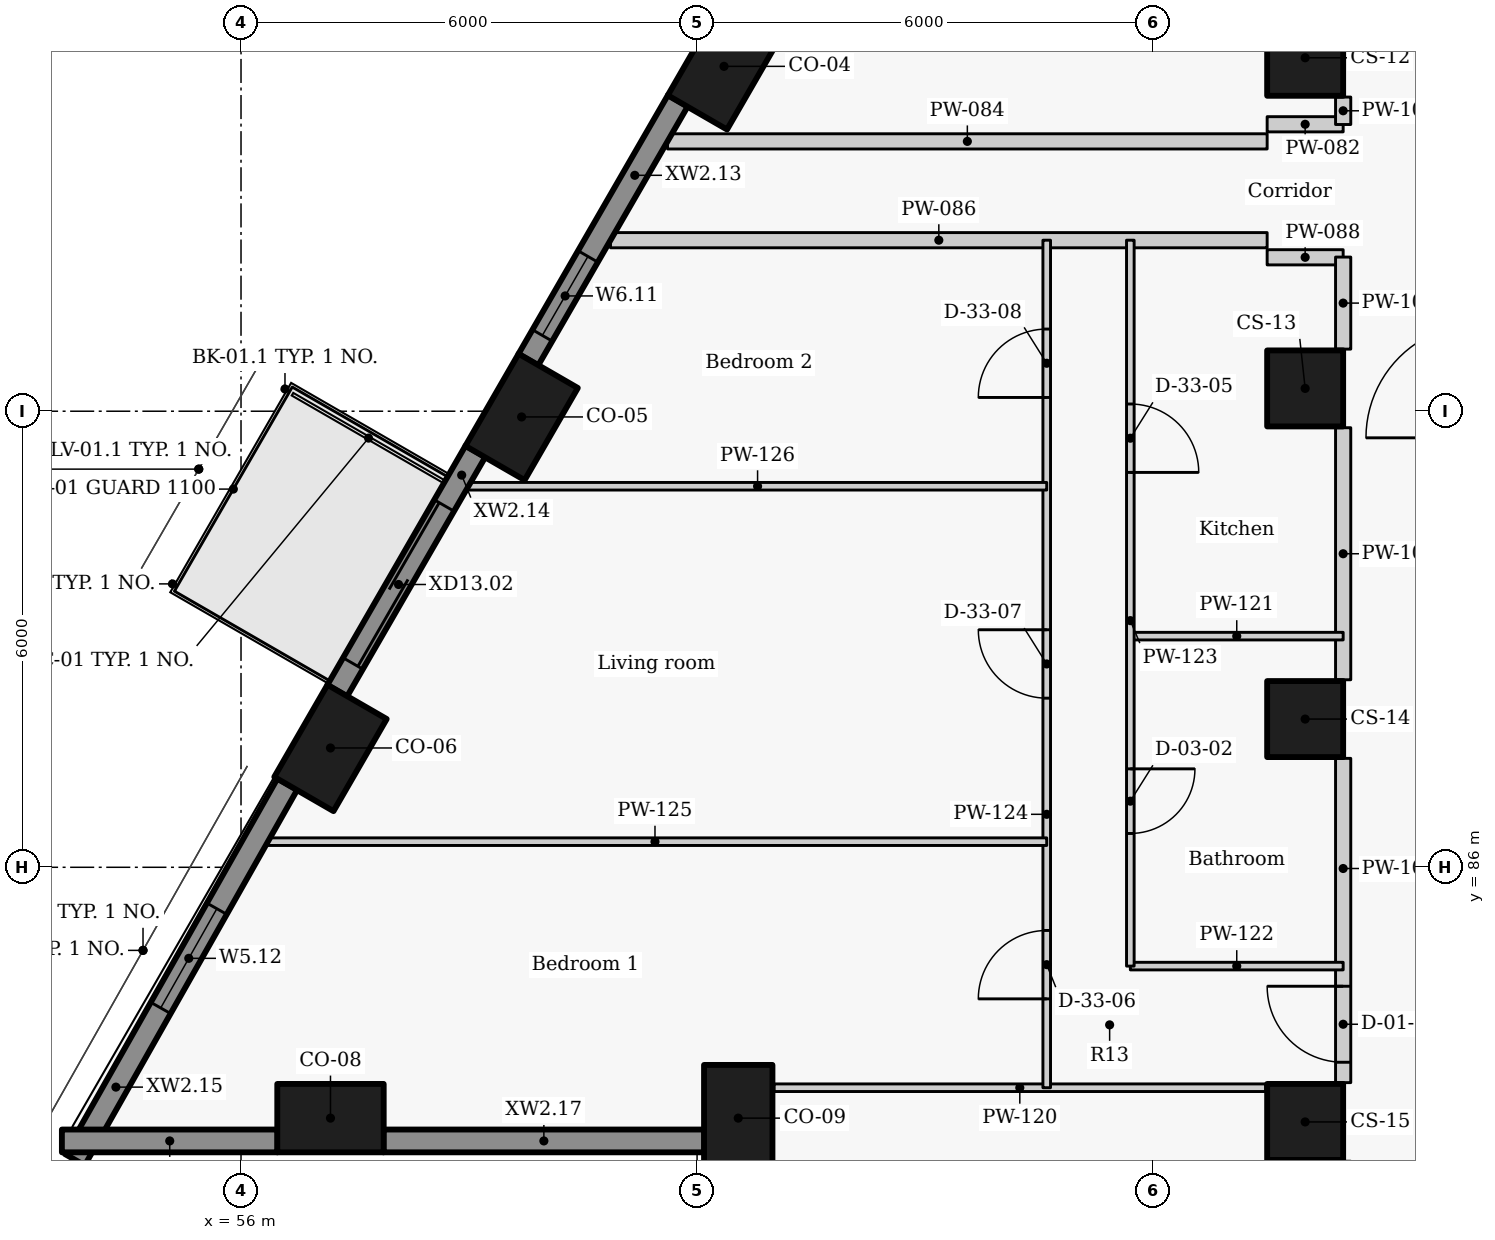
"""IFC4 building model, lengths in metres.
Left out: names, types, materials, properties, quantities, classifications, styles, units other than length and angle.
Written with IfcOpenShell. Run it as: python <this file> out.ifc"""

import sys

from ifc_helpers import new_model, si_unit, direction, frame, frame_2d, origin, origin_2d, place, context, subcontext, project, spatial, rectangle, extrude, element, fill, save


model = new_model("IFC4")
c1 = context("Model", 3, precision=1e-05, world=origin(), true_north=direction((0.0, 1.0)))
c2 = subcontext(c1, "Body", "Model", "MODEL_VIEW")
j1 = project(units=[si_unit("LENGTHUNIT", "METRE"), si_unit("PLANEANGLEUNIT", "RADIAN")], contexts=[c1])
p1 = place(None, origin())
s1 = spatial("IfcSite", under=j1, at=p1, CompositionType="ELEMENT")
p2 = place(p1, origin())
s2 = spatial("IfcBuilding", under=s1, at=p2, CompositionType="ELEMENT")
p3 = place(p2, frame((0.0, 0.0, 114.0)))
s3 = spatial("IfcBuildingStorey", under=s2, at=p3, CompositionType="ELEMENT", Elevation=114.0)
for number, where, z_axis, x_axis in (
    (1, (62.354, 96.537, 0.0), (0.0, 0.0, 1.0), (-0.5, -0.866, 0.0)),
    (2, (59.692, 91.925, 0.0), (0.0, 0.0, 1.0), (-0.5, -0.866, 0.0)),
    (3, (57.177, 87.57, 0.0), (0.0, 0.0, 1.0), (-0.5, -0.866, 0.0)),
    (4, (57.177, 82.7, 0.0), (0.0, 0.0, 1.0), (1.0, 0.0, 0.0)),
    (5, (62.542, 82.7, 0.0), (0.0, 0.0, 1.0), (0.0, -1.0, 0.0)),
):
    element("IfcColumn", number, at=place(p3, frame(where, z_axis=z_axis, x_axis=x_axis)), inside=s3, PredefinedType="COLUMN", context=c2, shape_type="SweptSolid", body=[
        extrude(rectangle(XDim=1.4, YDim=0.9, at=origin_2d()), origin(), (0.0, 0.0, 1.0), 3.3),
    ])
for number, where, z_axis, x_axis in (
    (6, (70.0, 96.65, 0.0), (0.0, 0.0, 1.0), (0.0, -1.0, 0.0)),
    (7, (70.0, 92.3, 0.0), (0.0, 0.0, 1.0), (0.0, -1.0, 0.0)),
    (8, (70.0, 87.95, 0.0), (0.0, 0.0, 1.0), (0.0, -1.0, 0.0)),
    (9, (70.0, 82.65, 0.0), (0.0, 0.0, 1.0), (0.0, -1.0, 0.0)),
):
    element("IfcColumn", number, at=place(p3, frame(where, z_axis=z_axis, x_axis=x_axis)), inside=s3, PredefinedType="COLUMN", context=c2, shape_type="SweptSolid", body=[
        extrude(rectangle(XDim=1.0, YDim=1.0, at=origin_2d()), origin(), (0.0, 0.0, 1.0), 3.3),
    ])
p4 = place(p3, frame((61.747, 96.084, 0.0), z_axis=(0.0, 0.0, 1.0), x_axis=(-0.499957037901, -0.866050206543, 0.0)))
e10 = element("IfcWall", 10, at=p4, inside=s3, PredefinedType="SOLIDWALL", context=c2, shape_type="SweptSolid", body=[
    extrude(rectangle(XDim=3.934, YDim=0.3, at=frame_2d((1.967, 0.0))), origin(), (0.0, 0.0, 1.0), 2.425),
])
p5 = place(p4, frame((2.365, 0.0, 0.9)))
e11 = element("IfcOpeningElement", 11, at=p5, cuts=e10, PredefinedType="OPENING", context=c2, shape_type="SweptSolid", body=[
    extrude(rectangle(XDim=1.2, YDim=1.1, at=frame_2d((0.6, 0.55))), frame((0.0, 0.16, 0.0), z_axis=(0.0, -1.0, 0.0), x_axis=(1.0, 0.0, 0.0)), (0.0, 0.0, 1.0), 0.32),
])
p6 = place(p3, frame((59.084, 91.472, 0.0), z_axis=(0.0, 0.0, 1.0), x_axis=(-0.500009139881, -0.866020126807, 0.0)))
e12 = element("IfcWall", 12, at=p6, inside=s3, PredefinedType="SOLIDWALL", context=c2, shape_type="SweptSolid", body=[
    extrude(rectangle(XDim=3.637, YDim=0.3, at=frame_2d((1.818, 0.0))), origin(), (0.0, 0.0, 1.0), 2.425),
])
p7 = place(p6, frame((0.823, 0.0, 0.0)))
e13 = element("IfcOpeningElement", 13, at=p7, cuts=e12, PredefinedType="OPENING", context=c2, shape_type="SweptSolid", body=[
    extrude(rectangle(XDim=2.4, YDim=2.0, at=frame_2d((1.2, 1.0))), frame((0.0, 0.16, 0.0), z_axis=(0.0, -1.0, 0.0), x_axis=(1.0, 0.0, 0.0)), (0.0, 0.0, 1.0), 0.32),
])
p8 = place(p3, frame((56.609, 87.094, 0.0), z_axis=(0.0, 0.0, 1.0), x_axis=(-0.492456858874, -0.870336855561, 0.0)))
e14 = element("IfcWall", 14, at=p8, inside=s3, PredefinedType="SOLIDWALL", context=c2, shape_type="SweptSolid", body=[
    extrude(rectangle(XDim=5.677, YDim=0.3, at=frame_2d((2.838, 0.0))), origin(), (0.0, 0.0, 1.0), 2.425),
])
p9 = place(p8, frame((1.883, 0.0, 0.9)))
e15 = element("IfcOpeningElement", 15, at=p9, cuts=e14, PredefinedType="OPENING", context=c2, shape_type="SweptSolid", body=[
    extrude(rectangle(XDim=1.5, YDim=1.1, at=frame_2d((0.75, 0.55))), frame((0.0, 0.16, 0.0), z_axis=(0.0, -1.0, 0.0), x_axis=(1.0, 0.0, 0.0)), (0.0, 0.0, 1.0), 0.32),
])
p10 = place(p3, frame((53.643, 82.4, 0.0), z_axis=(0.0, 0.0, 1.0), x_axis=(1.0, 0.0, 0.0)))
e16 = element("IfcWall", 16, at=p10, inside=s3, PredefinedType="SOLIDWALL", context=c2, shape_type="SweptSolid", body=[
    extrude(rectangle(XDim=2.838, YDim=0.3, at=frame_2d((1.419, 0.0))), origin(), (0.0, 0.0, 1.0), 2.425),
])
p11 = place(p3, frame((57.873, 82.4, 0.0), z_axis=(0.0, 0.0, 1.0), x_axis=(1.0, 0.0, 0.0)))
e17 = element("IfcWall", 17, at=p11, inside=s3, PredefinedType="SOLIDWALL", context=c2, shape_type="SweptSolid", body=[
    extrude(rectangle(XDim=4.223, YDim=0.3, at=frame_2d((2.111, 0.0))), origin(), (0.0, 0.0, 1.0), 2.425),
])
p12 = place(p3, frame((69.5, 95.775, 0.0), z_axis=(0.0, 0.0, 1.0), x_axis=(1.0, 0.0, 0.0)))
e18 = element("IfcWall", 18, at=p12, inside=s3, PredefinedType="PARTITIONING", context=c2, shape_type="SweptSolid", body=[
    extrude(rectangle(XDim=1.0, YDim=0.2, at=frame_2d((0.5, 0.0))), origin(), (0.0, 0.0, 1.0), 2.505),
])
p13 = place(p3, frame((61.611, 95.55, 0.0), z_axis=(0.0, 0.0, 1.0), x_axis=(1.0, 0.0, 0.0)))
e19 = element("IfcWall", 19, at=p13, inside=s3, PredefinedType="PARTITIONING", context=c2, shape_type="SweptSolid", body=[
    extrude(rectangle(XDim=7.889, YDim=0.2, at=frame_2d((3.944, 0.0))), origin(), (0.0, 0.0, 1.0), 2.405),
])
p14 = place(p3, frame((60.861, 94.25, 0.0), z_axis=(0.0, 0.0, 1.0), x_axis=(1.0, 0.0, 0.0)))
e20 = element("IfcWall", 20, at=p14, inside=s3, PredefinedType="PARTITIONING", context=c2, shape_type="SweptSolid", body=[
    extrude(rectangle(XDim=8.639, YDim=0.2, at=frame_2d((4.32, 0.0))), origin(), (0.0, 0.0, 1.0), 2.405),
])
p15 = place(p3, frame((69.5, 94.025, 0.0), z_axis=(0.0, 0.0, 1.0), x_axis=(1.0, 0.0, 0.0)))
e21 = element("IfcWall", 21, at=p15, inside=s3, PredefinedType="PARTITIONING", context=c2, shape_type="SweptSolid", body=[
    extrude(rectangle(XDim=1.0, YDim=0.2, at=frame_2d((0.5, 0.0))), origin(), (0.0, 0.0, 1.0), 2.505),
])
p16 = place(p3, frame((70.5, 83.167, 0.0), z_axis=(0.0, 0.0, 1.0), x_axis=(0.0, 1.0, 0.0)))
e22 = element("IfcWall", 22, at=p16, inside=s3, PredefinedType="PARTITIONING", context=c2, shape_type="SweptSolid", body=[
    extrude(rectangle(XDim=4.266, YDim=0.2, at=frame_2d((2.133, 0.0))), origin(), (0.0, 0.0, 1.0), 3.025),
])
p17 = place(p16, frame((0.268, 0.0, 0.0)))
e23 = element("IfcOpeningElement", 23, at=p17, cuts=e22, PredefinedType="OPENING", context=c2, shape_type="SweptSolid", body=[
    extrude(rectangle(XDim=1.0, YDim=2.1, at=frame_2d((0.5, 1.05))), frame((0.0, 0.11, 0.0), z_axis=(0.0, -1.0, 0.0), x_axis=(1.0, 0.0, 0.0)), (0.0, 0.0, 1.0), 0.22),
])
p18 = place(p3, frame((70.5, 88.467, 0.0), z_axis=(0.0, 0.0, 1.0), x_axis=(0.0, 1.0, 0.0)))
e24 = element("IfcWall", 24, at=p18, inside=s3, PredefinedType="PARTITIONING", context=c2, shape_type="SweptSolid", body=[
    extrude(rectangle(XDim=3.316, YDim=0.2, at=frame_2d((1.658, 0.0))), origin(), (0.0, 0.0, 1.0), 3.025),
])
p19 = place(p3, frame((70.5, 92.817, 0.0), z_axis=(0.0, 0.0, 1.0), x_axis=(0.0, 1.0, 0.0)))
e25 = element("IfcWall", 25, at=p19, inside=s3, PredefinedType="PARTITIONING", context=c2, shape_type="SweptSolid", body=[
    extrude(rectangle(XDim=1.211, YDim=0.2, at=frame_2d((0.605, 0.0))), origin(), (0.0, 0.0, 1.0), 3.025),
])
p20 = place(p3, frame((70.5, 95.772, 0.0), z_axis=(0.0, 0.0, 1.0), x_axis=(0.0, 1.0, 0.0)))
e26 = element("IfcWall", 26, at=p20, inside=s3, PredefinedType="PARTITIONING", context=c2, shape_type="SweptSolid", body=[
    extrude(rectangle(XDim=0.361, YDim=0.2, at=frame_2d((0.181, 0.0))), origin(), (0.0, 0.0, 1.0), 3.025),
])
p21 = place(p3, frame((63.012, 83.1, 0.0), z_axis=(0.0, 0.0, 1.0), x_axis=(1.0, 0.0, 0.0)))
e27 = element("IfcWall", 27, at=p21, inside=s3, PredefinedType="PARTITIONING", context=c2, shape_type="SweptSolid", body=[
    extrude(rectangle(XDim=6.468, YDim=0.1, at=frame_2d((3.234, 0.0))), origin(), (0.0, 0.0, 1.0), 3.025),
])
for number, where, z_axis, x_axis in (
    (28, (67.7, 89.041, 0.0), (0.0, 0.0, 1.0), (1.0, 0.0, 0.0)),
    (29, (67.7, 84.7, 0.0), (0.0, 0.0, 1.0), (1.0, 0.0, 0.0)),
):
    element("IfcWall", number, at=place(p3, frame(where, z_axis=z_axis, x_axis=x_axis)), inside=s3, PredefinedType="PARTITIONING", context=c2, shape_type="SweptSolid", body=[
        extrude(rectangle(XDim=2.8, YDim=0.1, at=frame_2d((1.4, 0.0))), origin(), (0.0, 0.0, 1.0), 2.505),
    ])
p22 = place(p3, frame((67.7, 94.25, 0.0), z_axis=(0.0, 0.0, 1.0), x_axis=(0.0, -1.0, 0.0)))
e30 = element("IfcWall", 30, at=p22, inside=s3, PredefinedType="PARTITIONING", context=c2, shape_type="SweptSolid", body=[
    extrude(rectangle(XDim=9.55, YDim=0.1, at=frame_2d((4.775, 0.0))), origin(), (0.0, 0.0, 1.0), 3.025),
])
p23 = place(p22, frame((6.955, 0.0, 0.0)))
e31 = element("IfcOpeningElement", 31, at=p23, cuts=e30, PredefinedType="OPENING", context=c2, shape_type="SweptSolid", body=[
    extrude(rectangle(XDim=0.85, YDim=2.1, at=frame_2d((0.425, 1.05))), frame((0.0, 0.06, 0.0), z_axis=(0.0, -1.0, 0.0), x_axis=(1.0, 0.0, 0.0)), (0.0, 0.0, 1.0), 0.12),
])
p24 = place(p22, frame((2.155, 0.0, 0.0)))
e32 = element("IfcOpeningElement", 32, at=p24, cuts=e30, PredefinedType="OPENING", context=c2, shape_type="SweptSolid", body=[
    extrude(rectangle(XDim=0.9, YDim=2.1, at=frame_2d((0.45, 1.05))), frame((0.0, 0.06, 0.0), z_axis=(0.0, -1.0, 0.0), x_axis=(1.0, 0.0, 0.0)), (0.0, 0.0, 1.0), 0.12),
])
p25 = place(p3, frame((66.6, 83.1, 0.0), z_axis=(0.0, 0.0, 1.0), x_axis=(0.0, 1.0, 0.0)))
e33 = element("IfcWall", 33, at=p25, inside=s3, PredefinedType="PARTITIONING", context=c2, shape_type="SweptSolid", body=[
    extrude(rectangle(XDim=11.15, YDim=0.1, at=frame_2d((5.575, 0.0))), origin(), (0.0, 0.0, 1.0), 3.025),
])
p26 = place(p25, frame((1.169, 0.0, 0.0)))
e34 = element("IfcOpeningElement", 34, at=p26, cuts=e33, PredefinedType="OPENING", context=c2, shape_type="SweptSolid", body=[
    extrude(rectangle(XDim=0.9, YDim=2.1, at=frame_2d((0.45, 1.05))), frame((0.0, 0.06, 0.0), z_axis=(0.0, -1.0, 0.0), x_axis=(1.0, 0.0, 0.0)), (0.0, 0.0, 1.0), 0.12),
])
p27 = place(p25, frame((5.125, 0.0, 0.0)))
e35 = element("IfcOpeningElement", 35, at=p27, cuts=e33, PredefinedType="OPENING", context=c2, shape_type="SweptSolid", body=[
    extrude(rectangle(XDim=0.9, YDim=2.1, at=frame_2d((0.45, 1.05))), frame((0.0, 0.06, 0.0), z_axis=(0.0, -1.0, 0.0), x_axis=(1.0, 0.0, 0.0)), (0.0, 0.0, 1.0), 0.12),
])
p28 = place(p25, frame((9.081, 0.0, 0.0)))
e36 = element("IfcOpeningElement", 36, at=p28, cuts=e33, PredefinedType="OPENING", context=c2, shape_type="SweptSolid", body=[
    extrude(rectangle(XDim=0.9, YDim=2.1, at=frame_2d((0.45, 1.05))), frame((0.0, 0.06, 0.0), z_axis=(0.0, -1.0, 0.0), x_axis=(1.0, 0.0, 0.0)), (0.0, 0.0, 1.0), 0.12),
])
p29 = place(p3, frame((56.292, 86.337, 0.0), z_axis=(0.0, 0.0, 1.0), x_axis=(1.0, 0.0, 0.0)))
e37 = element("IfcWall", 37, at=p29, inside=s3, PredefinedType="PARTITIONING", context=c2, shape_type="SweptSolid", body=[
    extrude(rectangle(XDim=10.308, YDim=0.1, at=frame_2d((5.154, 0.0))), origin(), (0.0, 0.0, 1.0), 2.405),
])
p30 = place(p3, frame((58.992, 91.013, 0.0), z_axis=(0.0, 0.0, 1.0), x_axis=(1.0, 0.0, 0.0)))
e38 = element("IfcWall", 38, at=p30, inside=s3, PredefinedType="PARTITIONING", context=c2, shape_type="SweptSolid", body=[
    extrude(rectangle(XDim=7.608, YDim=0.1, at=frame_2d((3.804, 0.0))), origin(), (0.0, 0.0, 1.0), 2.405),
])
p31 = place(p5, origin())
e39 = element("IfcWindow", 39, at=p31, inside=s3, PartitioningType="SINGLE_PANEL", PredefinedType="WINDOW", context=c2, shape_type="SweptSolid", body=[
    extrude(rectangle(XDim=1.2, YDim=1.1, at=frame_2d((0.6, 0.55))), frame((0.0, 0.03, 0.0), z_axis=(0.0, -1.0, 0.0), x_axis=(1.0, 0.0, 0.0)), (0.0, 0.0, 1.0), 0.06),
])
fill(e11, e39)
p32 = place(p7, origin())
e40 = element("IfcDoor", 40, at=p32, inside=s3, OperationType="DOUBLE_DOOR_SLIDING", PredefinedType="DOOR", context=c2, shape_type="SweptSolid", body=[
    extrude(rectangle(XDim=2.4, YDim=2.0, at=frame_2d((1.2, 1.0))), frame((0.0, 0.025, 0.0), z_axis=(0.0, -1.0, 0.0), x_axis=(1.0, 0.0, 0.0)), (0.0, 0.0, 1.0), 0.05),
])
fill(e13, e40)
p33 = place(p9, origin())
e41 = element("IfcWindow", 41, at=p33, inside=s3, PartitioningType="SINGLE_PANEL", PredefinedType="WINDOW", context=c2, shape_type="SweptSolid", body=[
    extrude(rectangle(XDim=1.5, YDim=1.1, at=frame_2d((0.75, 0.55))), frame((0.0, 0.03, 0.0), z_axis=(0.0, -1.0, 0.0), x_axis=(1.0, 0.0, 0.0)), (0.0, 0.0, 1.0), 0.06),
])
fill(e15, e41)
p34 = place(p17, origin())
e42 = element("IfcDoor", 42, at=p34, inside=s3, OperationType="SINGLE_SWING_RIGHT", PredefinedType="DOOR", context=c2, shape_type="SweptSolid", body=[
    extrude(rectangle(XDim=1.0, YDim=2.1, at=frame_2d((0.5, 1.05))), frame((0.0, 0.025, 0.0), z_axis=(0.0, -1.0, 0.0), x_axis=(1.0, 0.0, 0.0)), (0.0, 0.0, 1.0), 0.05),
])
fill(e23, e42)
p35 = place(p23, origin())
e43 = element("IfcDoor", 43, at=p35, inside=s3, OperationType="SINGLE_SWING_LEFT", PredefinedType="DOOR", context=c2, shape_type="SweptSolid", body=[
    extrude(rectangle(XDim=0.85, YDim=2.1, at=frame_2d((0.425, 1.05))), frame((0.0, 0.025, 0.0), z_axis=(0.0, -1.0, 0.0), x_axis=(1.0, 0.0, 0.0)), (0.0, 0.0, 1.0), 0.05),
])
fill(e31, e43)
p36 = place(p24, origin())
e44 = element("IfcDoor", 44, at=p36, inside=s3, OperationType="SINGLE_SWING_RIGHT", PredefinedType="DOOR", context=c2, shape_type="SweptSolid", body=[
    extrude(rectangle(XDim=0.9, YDim=2.1, at=frame_2d((0.45, 1.05))), frame((0.0, 0.025, 0.0), z_axis=(0.0, -1.0, 0.0), x_axis=(1.0, 0.0, 0.0)), (0.0, 0.0, 1.0), 0.05),
])
fill(e32, e44)
p37 = place(p26, origin())
e45 = element("IfcDoor", 45, at=p37, inside=s3, OperationType="SINGLE_SWING_LEFT", PredefinedType="DOOR", context=c2, shape_type="SweptSolid", body=[
    extrude(rectangle(XDim=0.9, YDim=2.1, at=frame_2d((0.45, 1.05))), frame((0.0, 0.025, 0.0), z_axis=(0.0, -1.0, 0.0), x_axis=(1.0, 0.0, 0.0)), (0.0, 0.0, 1.0), 0.05),
])
fill(e34, e45)
p38 = place(p27, origin())
e46 = element("IfcDoor", 46, at=p38, inside=s3, OperationType="SINGLE_SWING_RIGHT", PredefinedType="DOOR", context=c2, shape_type="SweptSolid", body=[
    extrude(rectangle(XDim=0.9, YDim=2.1, at=frame_2d((0.45, 1.05))), frame((0.0, 0.025, 0.0), z_axis=(0.0, -1.0, 0.0), x_axis=(1.0, 0.0, 0.0)), (0.0, 0.0, 1.0), 0.05),
])
fill(e35, e46)
p39 = place(p28, origin())
e47 = element("IfcDoor", 47, at=p39, inside=s3, OperationType="SINGLE_SWING_LEFT", PredefinedType="DOOR", context=c2, shape_type="SweptSolid", body=[
    extrude(rectangle(XDim=0.9, YDim=2.1, at=frame_2d((0.45, 1.05))), frame((0.0, 0.025, 0.0), z_axis=(0.0, -1.0, 0.0), x_axis=(1.0, 0.0, 0.0)), (0.0, 0.0, 1.0), 0.05),
])
fill(e36, e47)
save(model, sys.argv[1])
